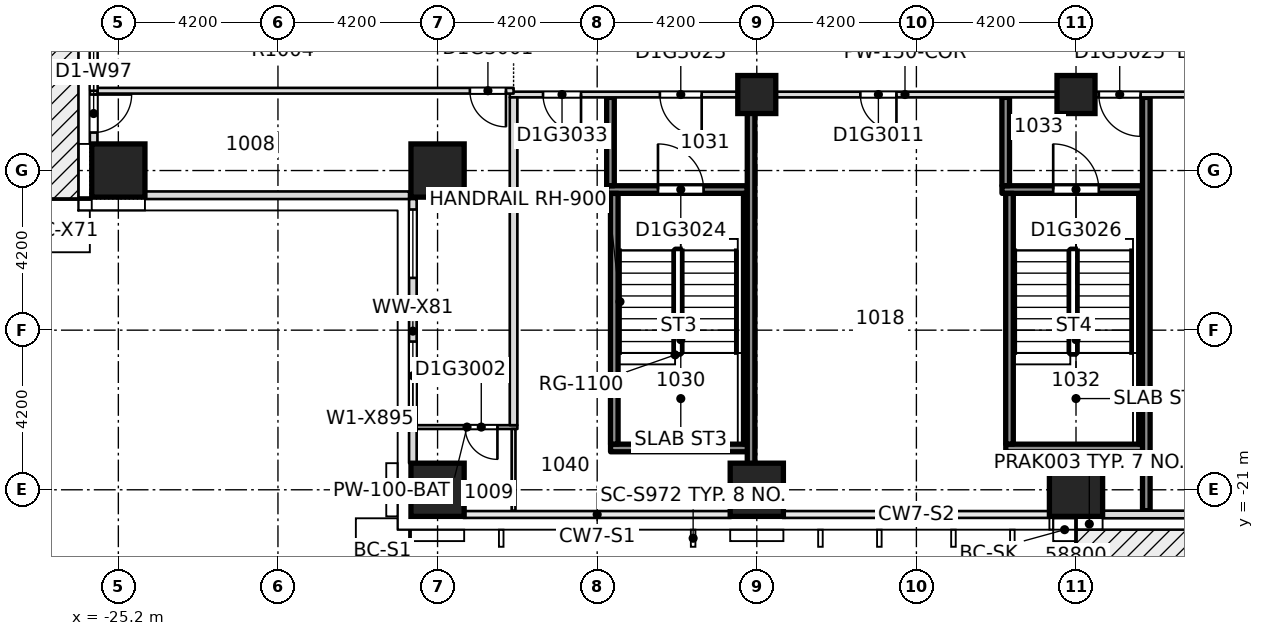
"""IFC4 building model, lengths in metres.
Left out: names, types, materials, properties, quantities, classifications, styles, units other than length and angle.
Written with IfcOpenShell. Run it as: python <this file> out.ifc"""

import sys

from ifc_helpers import new_model, si_unit, direction, frame, frame_2d, origin, origin_2d, place, context, subcontext, project, spatial, rectangle, extrude, element, fill, save


model = new_model("IFC4")
c1 = context("Model", 3, precision=1e-05, world=origin(), true_north=direction((0.0, 1.0)))
c2 = subcontext(c1, "Body", "Model", "MODEL_VIEW")
j1 = project(units=[si_unit("LENGTHUNIT", "METRE"), si_unit("PLANEANGLEUNIT", "RADIAN")], contexts=[c1])
p1 = place(None, origin())
s1 = spatial("IfcSite", under=j1, at=p1, CompositionType="ELEMENT")
p2 = place(p1, origin())
s2 = spatial("IfcBuilding", under=s1, at=p2, CompositionType="ELEMENT")
p3 = place(p2, frame((0.0, 0.0, 48.3)))
s3 = spatial("IfcBuildingStorey", under=s2, at=p3, CompositionType="ELEMENT", Elevation=48.3)
for number, where, z_axis, x_axis in (
    (1, (-16.8, -21.0, -0.32), (0.0, 0.0, 1.0), (1.0, 0.0, 0.0)),
    (2, (-8.4, -21.0, -0.32), (0.0, 0.0, 1.0), (1.0, 0.0, 0.0)),
    (3, (0.0, -21.0, -0.32), (0.0, 0.0, 1.0), (1.0, 0.0, 0.0)),
    (4, (-25.2, -12.6, -0.32), (0.0, 0.0, 1.0), (1.0, 0.0, 0.0)),
    (5, (-16.8, -12.6, -0.32), (0.0, 0.0, 1.0), (1.0, 0.0, 0.0)),
):
    element("IfcColumn", number, at=place(p3, frame(where, z_axis=z_axis, x_axis=x_axis)), inside=s3, PredefinedType="COLUMN", context=c2, shape_type="SweptSolid", body=[
        extrude(rectangle(XDim=1.4, YDim=1.4, at=origin_2d()), origin(), (0.0, 0.0, 1.0), 3.45),
    ])
for number, where, z_axis, x_axis in (
    (6, (-8.4, -10.6, -0.32), (0.0, 0.0, 1.0), (1.0, 0.0, 0.0)),
    (7, (0.0, -10.6, -0.32), (0.0, 0.0, 1.0), (1.0, 0.0, 0.0)),
):
    element("IfcColumn", number, at=place(p3, frame(where, z_axis=z_axis, x_axis=x_axis)), inside=s3, PredefinedType="COLUMN", context=c2, shape_type="SweptSolid", body=[
        extrude(rectangle(XDim=1.0, YDim=1.0, at=origin_2d()), origin(), (0.0, 0.0, 1.0), 3.45),
    ])
p4 = place(p3, frame((-12.248, -19.9, 0.0), z_axis=(0.0, 0.0, 1.0), x_axis=(1.0, 0.0, 0.0)))
e8 = element("IfcWall", 8, at=p4, inside=s3, PredefinedType="SOLIDWALL", context=c2, shape_type="SweptSolid", body=[
    extrude(rectangle(XDim=3.696, YDim=0.2, at=frame_2d((1.848, 0.0))), origin(), (0.0, 0.0, 1.0), 3.13),
])
p5 = place(p3, frame((-1.848, -19.9, 0.0), z_axis=(0.0, 0.0, 1.0), x_axis=(1.0, 0.0, 0.0)))
e9 = element("IfcWall", 9, at=p5, inside=s3, PredefinedType="SOLIDWALL", context=c2, shape_type="SweptSolid", body=[
    extrude(rectangle(XDim=3.696, YDim=0.2, at=frame_2d((1.848, 0.0))), origin(), (0.0, 0.0, 1.0), 3.13),
])
p6 = place(p3, frame((-17.35, -19.35, 0.0), z_axis=(0.0, 0.0, 1.0), x_axis=(1.0, 0.0, 0.0)))
e10 = element("IfcWall", 10, at=p6, inside=s3, PredefinedType="PARTITIONING", context=c2, shape_type="SweptSolid", body=[
    extrude(rectangle(XDim=2.65, YDim=0.1, at=frame_2d((1.325, 0.0))), origin(), (0.0, 0.0, 1.0), 3.13),
])
p7 = place(p6, frame((1.275, 0.0, 0.0)))
e11 = element("IfcOpeningElement", 11, at=p7, cuts=e10, PredefinedType="OPENING", context=c2, shape_type="SweptSolid", body=[
    extrude(rectangle(XDim=0.85, YDim=2.1, at=frame_2d((0.425, 1.05))), frame((0.0, 0.06, 0.0), z_axis=(0.0, -1.0, 0.0), x_axis=(1.0, 0.0, 0.0)), (0.0, 0.0, 1.0), 0.12),
])
p8 = place(p3, frame((-12.348, -13.1, 0.0), z_axis=(0.0, 0.0, 1.0), x_axis=(1.0, 0.0, 0.0)))
e12 = element("IfcWall", 12, at=p8, inside=s3, PredefinedType="SOLIDWALL", context=c2, shape_type="SweptSolid", body=[
    extrude(rectangle(XDim=3.696, YDim=0.2, at=frame_2d((1.848, 0.0))), origin(), (0.0, 0.0, 1.0), 3.13),
])
p9 = place(p8, frame((1.348, 0.0, 0.0)))
e13 = element("IfcOpeningElement", 13, at=p9, cuts=e12, PredefinedType="OPENING", context=c2, shape_type="SweptSolid", body=[
    extrude(rectangle(XDim=1.2, YDim=2.1, at=frame_2d((0.6, 1.05))), frame((0.0, 0.11, 0.0), z_axis=(0.0, -1.0, 0.0), x_axis=(1.0, 0.0, 0.0)), (0.0, 0.0, 1.0), 0.22),
])
p10 = place(p3, frame((-1.948, -13.1, 0.0), z_axis=(0.0, 0.0, 1.0), x_axis=(1.0, 0.0, 0.0)))
e14 = element("IfcWall", 14, at=p10, inside=s3, PredefinedType="SOLIDWALL", context=c2, shape_type="SweptSolid", body=[
    extrude(rectangle(XDim=3.696, YDim=0.2, at=frame_2d((1.848, 0.0))), origin(), (0.0, 0.0, 1.0), 3.13),
])
p11 = place(p10, frame((1.348, 0.0, 0.0)))
e15 = element("IfcOpeningElement", 15, at=p11, cuts=e14, PredefinedType="OPENING", context=c2, shape_type="SweptSolid", body=[
    extrude(rectangle(XDim=1.2, YDim=2.1, at=frame_2d((0.6, 1.05))), frame((0.0, 0.11, 0.0), z_axis=(0.0, -1.0, 0.0), x_axis=(1.0, 0.0, 0.0)), (0.0, 0.0, 1.0), 0.22),
])
p12 = place(p3, frame((-14.9, -10.6, 0.0), z_axis=(0.0, 0.0, 1.0), x_axis=(1.0, 0.0, 0.0)))
e16 = element("IfcWall", 16, at=p12, inside=s3, PredefinedType="PARTITIONING", context=c2, shape_type="SweptSolid", body=[
    extrude(rectangle(XDim=20.8, YDim=0.15, at=frame_2d((10.4, 0.0))), origin(), (0.0, 0.0, 1.0), 3.13),
])
p13 = place(p12, frame((9.225, 0.0, 0.0)))
e17 = element("IfcOpeningElement", 17, at=p13, cuts=e16, PredefinedType="OPENING", context=c2, shape_type="SweptSolid", body=[
    extrude(rectangle(XDim=0.95, YDim=2.1, at=frame_2d((0.475, 1.05))), frame((0.0, 0.085, 0.0), z_axis=(0.0, -1.0, 0.0), x_axis=(1.0, 0.0, 0.0)), (0.0, 0.0, 1.0), 0.17),
])
p14 = place(p12, frame((18.275, 0.0, 0.0)))
e18 = element("IfcOpeningElement", 18, at=p14, cuts=e16, PredefinedType="OPENING", context=c2, shape_type="SweptSolid", body=[
    extrude(rectangle(XDim=0.95, YDim=2.1, at=frame_2d((0.475, 1.05))), frame((0.0, 0.085, 0.0), z_axis=(0.0, -1.0, 0.0), x_axis=(1.0, 0.0, 0.0)), (0.0, 0.0, 1.0), 0.17),
])
p15 = place(p12, frame((3.95, 0.0, 0.0)))
e19 = element("IfcOpeningElement", 19, at=p15, cuts=e16, PredefinedType="OPENING", context=c2, shape_type="SweptSolid", body=[
    extrude(rectangle(XDim=1.1, YDim=2.1, at=frame_2d((0.55, 1.05))), frame((0.0, 0.085, 0.0), z_axis=(0.0, -1.0, 0.0), x_axis=(1.0, 0.0, 0.0)), (0.0, 0.0, 1.0), 0.17),
])
p16 = place(p12, frame((15.5, 0.0, 0.0)))
e20 = element("IfcOpeningElement", 20, at=p16, cuts=e16, PredefinedType="OPENING", context=c2, shape_type="SweptSolid", body=[
    extrude(rectangle(XDim=1.1, YDim=2.1, at=frame_2d((0.55, 1.05))), frame((0.0, 0.085, 0.0), z_axis=(0.0, -1.0, 0.0), x_axis=(1.0, 0.0, 0.0)), (0.0, 0.0, 1.0), 0.17),
])
p17 = place(p12, frame((0.875, 0.0, 0.0)))
e21 = element("IfcOpeningElement", 21, at=p17, cuts=e16, PredefinedType="OPENING", context=c2, shape_type="SweptSolid", body=[
    extrude(rectangle(XDim=1.0, YDim=2.1, at=frame_2d((0.5, 1.05))), frame((0.0, 0.085, 0.0), z_axis=(0.0, -1.0, 0.0), x_axis=(1.0, 0.0, 0.0)), (0.0, 0.0, 1.0), 0.17),
])
p18 = place(p3, frame((-25.75, -10.5, 0.0), z_axis=(0.0, 0.0, 1.0), x_axis=(1.0, 0.0, 0.0)))
e22 = element("IfcWall", 22, at=p18, inside=s3, PredefinedType="PARTITIONING", context=c2, shape_type="SweptSolid", body=[
    extrude(rectangle(XDim=10.95, YDim=0.15, at=frame_2d((5.475, 0.0))), origin(), (0.0, 0.0, 1.0), 3.13),
])
p19 = place(p18, frame((9.8, 0.0, 0.0)))
e23 = element("IfcOpeningElement", 23, at=p19, cuts=e22, PredefinedType="OPENING", context=c2, shape_type="SweptSolid", body=[
    extrude(rectangle(XDim=0.95, YDim=2.1, at=frame_2d((0.475, 1.05))), frame((0.0, 0.085, 0.0), z_axis=(0.0, -1.0, 0.0), x_axis=(1.0, 0.0, 0.0)), (0.0, 0.0, 1.0), 0.17),
])
p20 = place(p3, frame((-14.8, -21.55, 0.0), z_axis=(0.0, 0.0, 1.0), x_axis=(0.0, 1.0, 0.0)))
e24 = element("IfcWall", 24, at=p20, inside=s3, PredefinedType="PARTITIONING", context=c2, shape_type="SweptSolid", body=[
    extrude(rectangle(XDim=2.15, YDim=0.1, at=frame_2d((1.075, 0.0))), origin(), (0.0, 0.0, 1.0), 3.13),
])
p21 = place(p3, frame((-14.8, -19.3, 0.0), z_axis=(0.0, 0.0, 1.0), x_axis=(0.0, 1.0, 0.0)))
e25 = element("IfcWall", 25, at=p21, inside=s3, PredefinedType="PARTITIONING", context=c2, shape_type="SweptSolid", body=[
    extrude(rectangle(XDim=8.625, YDim=0.2, at=frame_2d((4.312, 0.0))), origin(), (0.0, 0.0, 1.0), 3.13),
])
p22 = place(p3, frame((-12.25, -12.998, 0.0), z_axis=(0.0, 0.0, 1.0), x_axis=(0.0, 1.0, 0.0)))
e26 = element("IfcWall", 26, at=p22, inside=s3, PredefinedType="SOLIDWALL", context=c2, shape_type="SweptSolid", body=[
    extrude(rectangle(XDim=2.323, YDim=0.2, at=frame_2d((1.162, 0.0))), origin(), (0.0, 0.0, 1.0), 3.13),
])
for number, where, z_axis, x_axis in (
    (27, (-12.15, -19.798, 0.0), (0.0, 0.0, 1.0), (0.0, 1.0, 0.0)),
    (28, (-8.65, -19.798, 0.0), (0.0, 0.0, 1.0), (0.0, 1.0, 0.0)),
):
    element("IfcWall", number, at=place(p3, frame(where, z_axis=z_axis, x_axis=x_axis)), inside=s3, PredefinedType="SOLIDWALL", context=c2, shape_type="SweptSolid", body=[
        extrude(rectangle(XDim=6.596, YDim=0.2, at=frame_2d((3.298, 0.0))), origin(), (0.0, 0.0, 1.0), 3.13),
    ])
p23 = place(p3, frame((-1.85, -12.998, 0.0), z_axis=(0.0, 0.0, 1.0), x_axis=(0.0, 1.0, 0.0)))
e29 = element("IfcWall", 29, at=p23, inside=s3, PredefinedType="SOLIDWALL", context=c2, shape_type="SweptSolid", body=[
    extrude(rectangle(XDim=2.323, YDim=0.2, at=frame_2d((1.162, 0.0))), origin(), (0.0, 0.0, 1.0), 3.13),
])
for number, where, z_axis, x_axis in (
    (30, (-1.75, -19.798, 0.0), (0.0, 0.0, 1.0), (0.0, 1.0, 0.0)),
    (31, (1.75, -19.798, 0.0), (0.0, 0.0, 1.0), (0.0, 1.0, 0.0)),
):
    element("IfcWall", number, at=place(p3, frame(where, z_axis=z_axis, x_axis=x_axis)), inside=s3, PredefinedType="SOLIDWALL", context=c2, shape_type="SweptSolid", body=[
        extrude(rectangle(XDim=6.596, YDim=0.2, at=frame_2d((3.298, 0.0))), origin(), (0.0, 0.0, 1.0), 3.13),
    ])
p24 = place(p3, frame((0.7, -21.65, 0.0), z_axis=(0.0, 0.0, 1.0), x_axis=(1.0, 0.0, 0.0)))
e32 = element("IfcWall", 32, at=p24, inside=s3, PredefinedType="STANDARD", context=c2, shape_type="SweptSolid", body=[
    extrude(rectangle(XDim=7.0, YDim=0.2, at=frame_2d((3.5, 0.0))), origin(), (0.0, 0.0, 1.0), 3.13),
])
p25 = place(p24, frame((3.8, 0.0, 0.2)))
e33 = element("IfcOpeningElement", 33, at=p25, cuts=e32, PredefinedType="OPENING", context=c2, shape_type="SweptSolid", body=[
    extrude(rectangle(XDim=1.8, YDim=2.65, at=frame_2d((0.9, 1.325))), frame((0.0, 0.11, 0.0), z_axis=(0.0, -1.0, 0.0), x_axis=(1.0, 0.0, 0.0)), (0.0, 0.0, 1.0), 0.22),
])
p26 = place(p24, frame((5.7, 0.0, 0.0)))
e34 = element("IfcOpeningElement", 34, at=p26, cuts=e32, PredefinedType="OPENING", context=c2, shape_type="SweptSolid", body=[
    extrude(rectangle(XDim=1.0, YDim=2.4, at=frame_2d((0.5, 1.2))), frame((0.0, 0.11, 0.0), z_axis=(0.0, -1.0, 0.0), x_axis=(1.0, 0.0, 0.0)), (0.0, 0.0, 1.0), 0.22),
])
p27 = place(p3, frame((-25.85, -4.9, 0.0), z_axis=(0.0, 0.0, 1.0), x_axis=(0.0, -1.0, 0.0)))
e35 = element("IfcWall", 35, at=p27, inside=s3, PredefinedType="STANDARD", context=c2, shape_type="SweptSolid", body=[
    extrude(rectangle(XDim=7.0, YDim=0.2, at=frame_2d((3.5, 0.0))), origin(), (0.0, 0.0, 1.0), 3.13),
])
p28 = place(p27, frame((3.8, 0.0, 0.2)))
e36 = element("IfcOpeningElement", 36, at=p28, cuts=e35, PredefinedType="OPENING", context=c2, shape_type="SweptSolid", body=[
    extrude(rectangle(XDim=1.8, YDim=2.65, at=frame_2d((0.9, 1.325))), frame((0.0, 0.11, 0.0), z_axis=(0.0, -1.0, 0.0), x_axis=(1.0, 0.0, 0.0)), (0.0, 0.0, 1.0), 0.22),
])
p29 = place(p27, frame((5.7, 0.0, 0.0)))
e37 = element("IfcOpeningElement", 37, at=p29, cuts=e35, PredefinedType="OPENING", context=c2, shape_type="SweptSolid", body=[
    extrude(rectangle(XDim=1.0, YDim=2.4, at=frame_2d((0.5, 1.2))), frame((0.0, 0.11, 0.0), z_axis=(0.0, -1.0, 0.0), x_axis=(1.0, 0.0, 0.0)), (0.0, 0.0, 1.0), 0.22),
])
p30 = place(p27, frame((0.3, 0.0, 0.2)))
e38 = element("IfcOpeningElement", 38, at=p30, cuts=e35, PredefinedType="OPENING", context=c2, shape_type="SweptSolid", body=[
    extrude(rectangle(XDim=1.8, YDim=2.65, at=frame_2d((0.9, 1.325))), frame((0.0, 0.11, 0.0), z_axis=(0.0, -1.0, 0.0), x_axis=(1.0, 0.0, 0.0)), (0.0, 0.0, 1.0), 0.22),
])
p31 = place(p27, frame((2.2, 0.0, 0.0)))
e39 = element("IfcOpeningElement", 39, at=p31, cuts=e35, PredefinedType="OPENING", context=c2, shape_type="SweptSolid", body=[
    extrude(rectangle(XDim=1.0, YDim=2.4, at=frame_2d((0.5, 1.2))), frame((0.0, 0.11, 0.0), z_axis=(0.0, -1.0, 0.0), x_axis=(1.0, 0.0, 0.0)), (0.0, 0.0, 1.0), 0.22),
])
p32 = place(p3, frame((-24.5, -13.25, 0.0), z_axis=(0.0, 0.0, 1.0), x_axis=(1.0, 0.0, 0.0)))
e40 = element("IfcWall", 40, at=p32, inside=s3, PredefinedType="STANDARD", context=c2, shape_type="SweptSolid", body=[
    extrude(rectangle(XDim=6.95, YDim=0.2, at=frame_2d((3.475, 0.0))), origin(), (0.0, 0.0, 1.0), 3.13),
])
p33 = place(p3, frame((-17.45, -13.35, 0.0), z_axis=(0.0, 0.0, 1.0), x_axis=(0.0, -1.0, 0.0)))
e41 = element("IfcWall", 41, at=p33, inside=s3, PredefinedType="STANDARD", context=c2, shape_type="SweptSolid", body=[
    extrude(rectangle(XDim=6.95, YDim=0.2, at=frame_2d((3.475, 0.0))), origin(), (0.0, 0.0, 1.0), 3.13),
])
p34 = place(p33, frame((3.75, 0.0, 0.2)))
e42 = element("IfcOpeningElement", 42, at=p34, cuts=e41, PredefinedType="OPENING", context=c2, shape_type="SweptSolid", body=[
    extrude(rectangle(XDim=1.8, YDim=2.65, at=frame_2d((0.9, 1.325))), frame((0.0, 0.11, 0.0), z_axis=(0.0, -1.0, 0.0), x_axis=(1.0, 0.0, 0.0)), (0.0, 0.0, 1.0), 0.22),
])
p35 = place(p33, frame((0.275, 0.0, 0.2)))
e43 = element("IfcOpeningElement", 43, at=p35, cuts=e41, PredefinedType="OPENING", context=c2, shape_type="SweptSolid", body=[
    extrude(rectangle(XDim=1.8, YDim=2.65, at=frame_2d((0.9, 1.325))), frame((0.0, 0.11, 0.0), z_axis=(0.0, -1.0, 0.0), x_axis=(1.0, 0.0, 0.0)), (0.0, 0.0, 1.0), 0.22),
])
for number, where, z_axis, x_axis in (
    (44, (1.85, -21.55, 0.0), (0.0, 0.0, 1.0), (0.0, 1.0, 0.0)),
    (45, (-8.55, -21.55, 0.0), (0.0, 0.0, 1.0), (0.0, 1.0, 0.0)),
):
    element("IfcWall", number, at=place(p3, frame(where, z_axis=z_axis, x_axis=x_axis)), inside=s3, PredefinedType="SOLIDWALL", context=c2, shape_type="SweptSolid", body=[
        extrude(rectangle(XDim=10.875, YDim=0.2, at=frame_2d((5.438, 0.0))), origin(), (0.0, 0.0, 1.0), 3.13),
    ])
p36 = place(p19, origin())
e46 = element("IfcDoor", 46, at=p36, inside=s3, OperationType="SINGLE_SWING_RIGHT", PredefinedType="DOOR", context=c2, shape_type="SweptSolid", body=[
    extrude(rectangle(XDim=0.95, YDim=2.1, at=frame_2d((0.475, 1.05))), frame((0.0, 0.025, 0.0), z_axis=(0.0, -1.0, 0.0), x_axis=(1.0, 0.0, 0.0)), (0.0, 0.0, 1.0), 0.05),
])
fill(e23, e46)
p37 = place(p7, origin())
e47 = element("IfcDoor", 47, at=p37, inside=s3, OperationType="SINGLE_SWING_RIGHT", PredefinedType="DOOR", context=c2, shape_type="SweptSolid", body=[
    extrude(rectangle(XDim=0.85, YDim=2.1, at=frame_2d((0.425, 1.05))), frame((0.0, 0.025, 0.0), z_axis=(0.0, -1.0, 0.0), x_axis=(1.0, 0.0, 0.0)), (0.0, 0.0, 1.0), 0.05),
])
fill(e11, e47)
p38 = place(p13, origin())
e48 = element("IfcDoor", 48, at=p38, inside=s3, OperationType="SINGLE_SWING_LEFT", PredefinedType="DOOR", context=c2, shape_type="SweptSolid", body=[
    extrude(rectangle(XDim=0.95, YDim=2.1, at=frame_2d((0.475, 1.05))), frame((0.0, 0.025, 0.0), z_axis=(0.0, -1.0, 0.0), x_axis=(1.0, 0.0, 0.0)), (0.0, 0.0, 1.0), 0.05),
])
fill(e17, e48)
p39 = place(p15, origin())
e49 = element("IfcDoor", 49, at=p39, inside=s3, OperationType="SINGLE_SWING_RIGHT", PredefinedType="DOOR", context=c2, shape_type="SweptSolid", body=[
    extrude(rectangle(XDim=1.1, YDim=2.1, at=frame_2d((0.55, 1.05))), frame((0.0, 0.025, 0.0), z_axis=(0.0, -1.0, 0.0), x_axis=(1.0, 0.0, 0.0)), (0.0, 0.0, 1.0), 0.05),
])
fill(e19, e49)
p40 = place(p9, origin())
e50 = element("IfcDoor", 50, at=p40, inside=s3, OperationType="SINGLE_SWING_RIGHT", PredefinedType="DOOR", context=c2, shape_type="SweptSolid", body=[
    extrude(rectangle(XDim=1.2, YDim=2.1, at=frame_2d((0.6, 1.05))), frame((0.0, 0.025, 0.0), z_axis=(0.0, -1.0, 0.0), x_axis=(1.0, 0.0, 0.0)), (0.0, 0.0, 1.0), 0.05),
])
fill(e13, e50)
p41 = place(p16, origin())
e51 = element("IfcDoor", 51, at=p41, inside=s3, OperationType="SINGLE_SWING_LEFT", PredefinedType="DOOR", context=c2, shape_type="SweptSolid", body=[
    extrude(rectangle(XDim=1.1, YDim=2.1, at=frame_2d((0.55, 1.05))), frame((0.0, 0.025, 0.0), z_axis=(0.0, -1.0, 0.0), x_axis=(1.0, 0.0, 0.0)), (0.0, 0.0, 1.0), 0.05),
])
fill(e20, e51)
p42 = place(p11, origin())
e52 = element("IfcDoor", 52, at=p42, inside=s3, OperationType="SINGLE_SWING_RIGHT", PredefinedType="DOOR", context=c2, shape_type="SweptSolid", body=[
    extrude(rectangle(XDim=1.2, YDim=2.1, at=frame_2d((0.6, 1.05))), frame((0.0, 0.025, 0.0), z_axis=(0.0, -1.0, 0.0), x_axis=(1.0, 0.0, 0.0)), (0.0, 0.0, 1.0), 0.05),
])
fill(e15, e52)
p43 = place(p17, origin())
e53 = element("IfcDoor", 53, at=p43, inside=s3, OperationType="SINGLE_SWING_RIGHT", PredefinedType="DOOR", context=c2, shape_type="SweptSolid", body=[
    extrude(rectangle(XDim=1.0, YDim=2.1, at=frame_2d((0.5, 1.05))), frame((0.0, 0.025, 0.0), z_axis=(0.0, -1.0, 0.0), x_axis=(1.0, 0.0, 0.0)), (0.0, 0.0, 1.0), 0.05),
])
fill(e21, e53)
p44 = place(p28, origin())
e54 = element("IfcWindow", 54, at=p44, inside=s3, PartitioningType="SINGLE_PANEL", PredefinedType="WINDOW", context=c2, shape_type="SweptSolid", body=[
    extrude(rectangle(XDim=1.8, YDim=2.65, at=frame_2d((0.9, 1.325))), frame((0.0, 0.03, 0.0), z_axis=(0.0, -1.0, 0.0), x_axis=(1.0, 0.0, 0.0)), (0.0, 0.0, 1.0), 0.06),
])
fill(e36, e54)
p45 = place(p29, origin())
e55 = element("IfcDoor", 55, at=p45, inside=s3, OperationType="SINGLE_SWING_LEFT", PredefinedType="DOOR", context=c2, shape_type="SweptSolid", body=[
    extrude(rectangle(XDim=1.0, YDim=2.4, at=frame_2d((0.5, 1.2))), frame((0.0, 0.025, 0.0), z_axis=(0.0, -1.0, 0.0), x_axis=(1.0, 0.0, 0.0)), (0.0, 0.0, 1.0), 0.05),
])
fill(e37, e55)
p46 = place(p34, origin())
e56 = element("IfcWindow", 56, at=p46, inside=s3, PartitioningType="SINGLE_PANEL", PredefinedType="WINDOW", context=c2, shape_type="SweptSolid", body=[
    extrude(rectangle(XDim=1.8, YDim=2.65, at=frame_2d((0.9, 1.325))), frame((0.0, 0.03, 0.0), z_axis=(0.0, -1.0, 0.0), x_axis=(1.0, 0.0, 0.0)), (0.0, 0.0, 1.0), 0.06),
])
fill(e42, e56)
p47 = place(p35, origin())
e57 = element("IfcWindow", 57, at=p47, inside=s3, PartitioningType="SINGLE_PANEL", PredefinedType="WINDOW", context=c2, shape_type="SweptSolid", body=[
    extrude(rectangle(XDim=1.8, YDim=2.65, at=frame_2d((0.9, 1.325))), frame((0.0, 0.03, 0.0), z_axis=(0.0, -1.0, 0.0), x_axis=(1.0, 0.0, 0.0)), (0.0, 0.0, 1.0), 0.06),
])
fill(e43, e57)
save(model, sys.argv[1])
